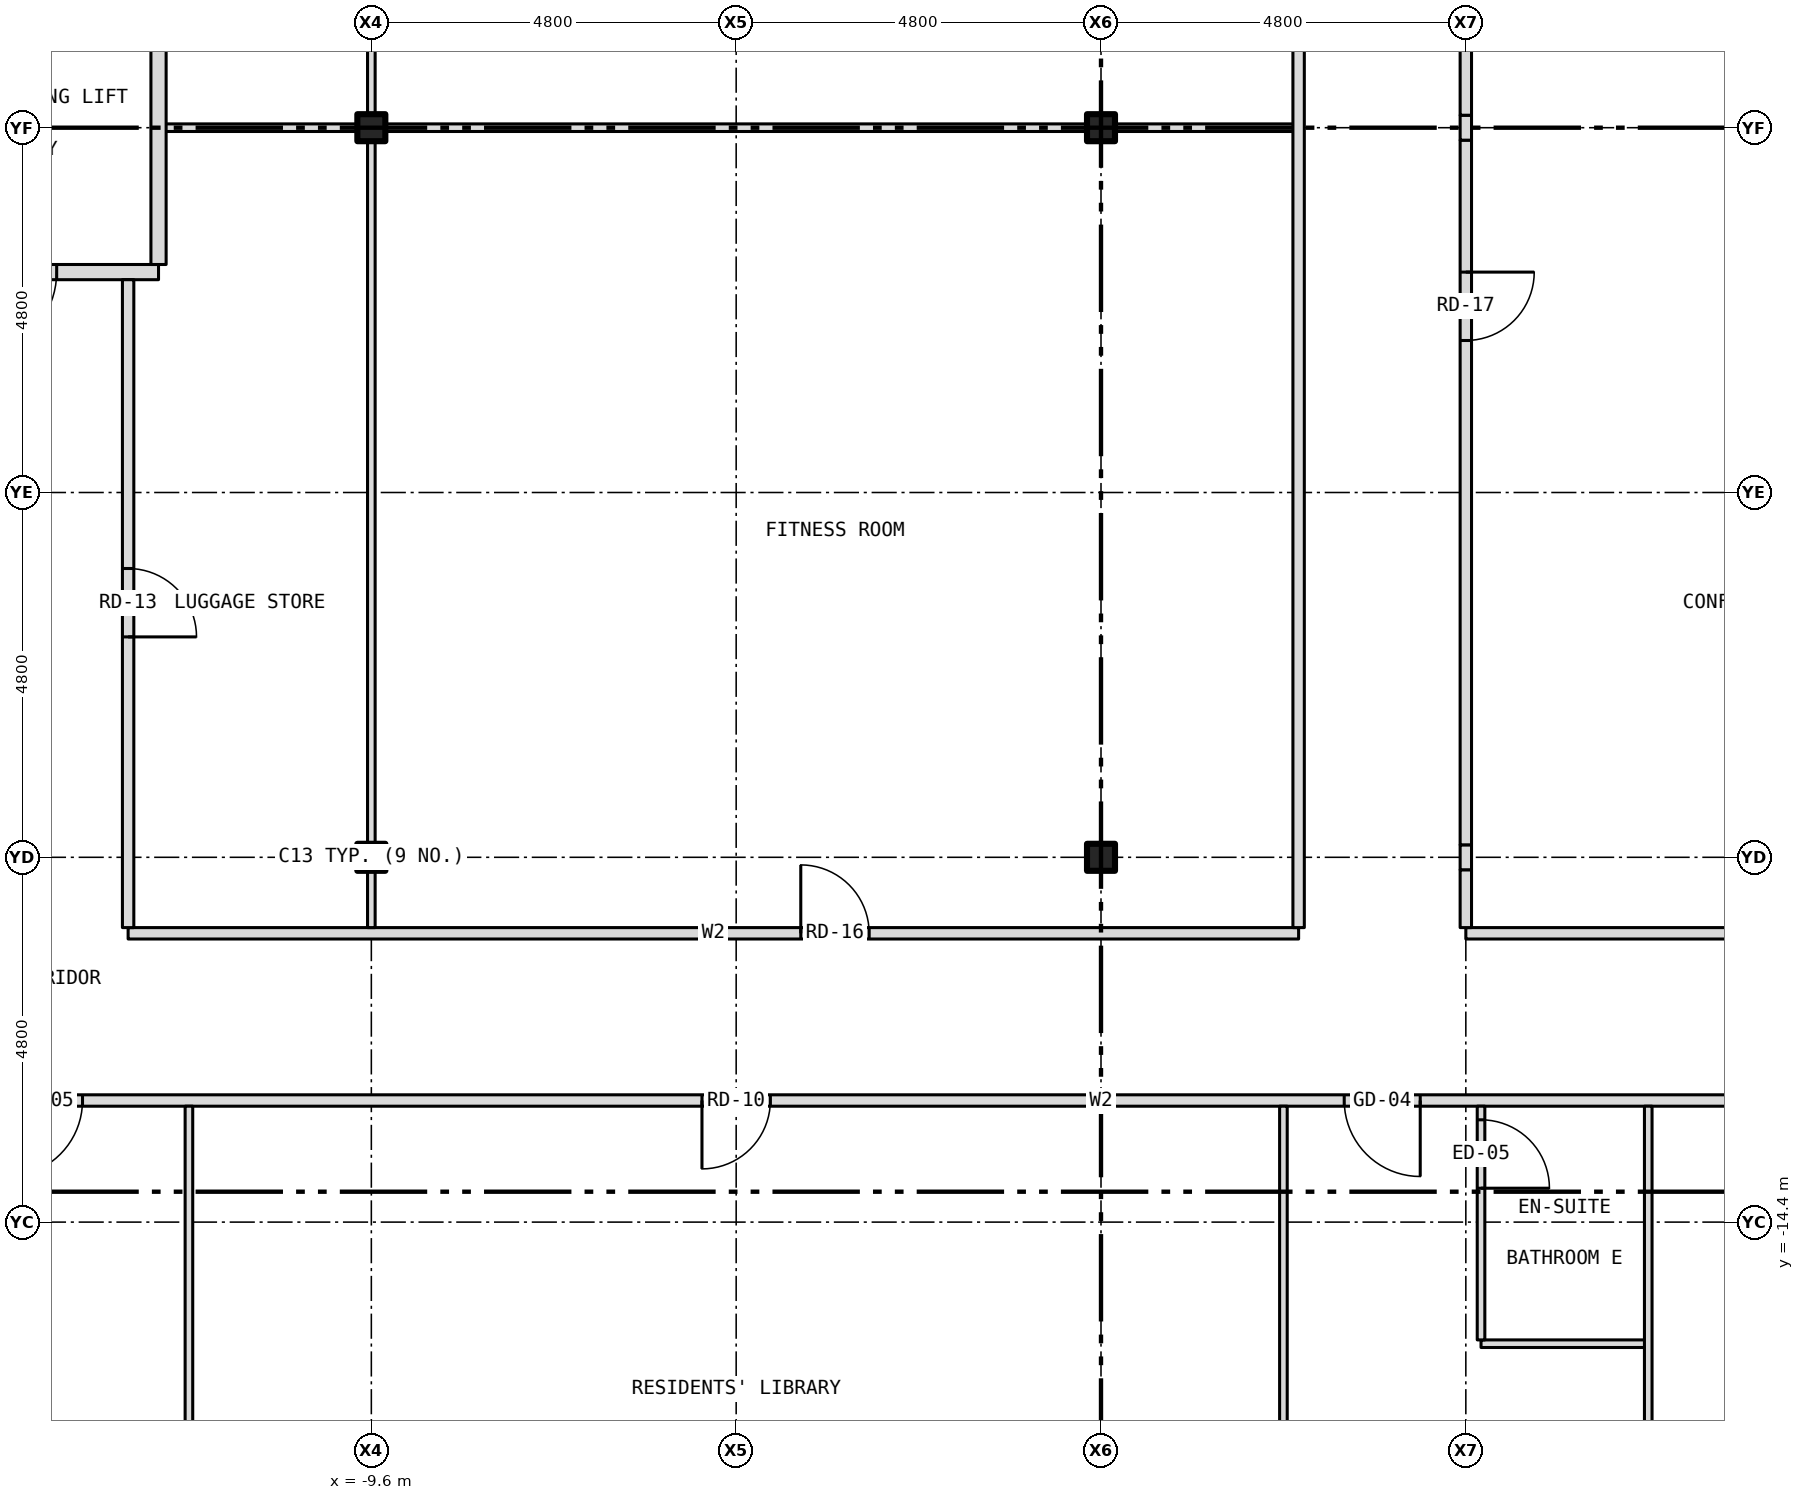
"""IFC4 building model, lengths in metres.
Left out: names, types, materials, properties, quantities, classifications, styles, units other than length and angle.
Written with IfcOpenShell. Run it as: python <this file> out.ifc"""

import sys

from ifc_helpers import new_model, si_unit, direction, frame, frame_2d, origin, origin_2d, place, context, subcontext, project, spatial, rectangle, i_section, extrude, element, fill, save


model = new_model("IFC4")
c1 = context("Model", 3, precision=1e-05, world=origin(), true_north=direction((0.0, 1.0)))
c2 = subcontext(c1, "Body", "Model", "MODEL_VIEW")
j1 = project(units=[si_unit("LENGTHUNIT", "METRE"), si_unit("PLANEANGLEUNIT", "RADIAN")], contexts=[c1])
p1 = place(None, origin())
s1 = spatial("IfcSite", under=j1, at=p1, CompositionType="ELEMENT")
p2 = place(p1, origin())
s2 = spatial("IfcBuilding", under=s1, at=p2, CompositionType="ELEMENT")
p3 = place(p2, frame((0.0, 0.0, 255.0)))
s3 = spatial("IfcBuildingStorey", under=s2, at=p3, CompositionType="ELEMENT", Elevation=255.0)
for number, where, z_axis, x_axis in (
    (1, (-9.6, -9.6, -0.15), (0.0, 0.0, 1.0), (1.0, 0.0, 0.0)),
    (2, (-9.6, 0.0, -0.15), (0.0, 0.0, 1.0), (1.0, 0.0, 0.0)),
    (3, (0.0, -9.6, -0.15), (0.0, 0.0, 1.0), (1.0, 0.0, 0.0)),
    (4, (0.0, 0.0, -0.15), (0.0, 0.0, 1.0), (1.0, 0.0, 0.0)),
):
    element("IfcColumn", number, at=place(p3, frame(where, z_axis=z_axis, x_axis=x_axis)), inside=s3, PredefinedType="COLUMN", context=c2, shape_type="SweptSolid", body=[
        extrude(i_section(OverallWidth=0.368, OverallDepth=0.356, WebThickness=0.011, FlangeThickness=0.018, at=origin_2d()), origin(), (0.0, 0.0, 1.0), 3.5),
    ])
p4 = place(p3, frame((5.0, -16.0, 0.0), z_axis=(0.0, 0.0, 1.0), x_axis=(1.0, 0.0, 0.0)))
e5 = element("IfcWall", 5, at=p4, inside=s3, PredefinedType="PARTITIONING", context=c2, shape_type="SweptSolid", body=[
    extrude(rectangle(XDim=2.2, YDim=0.1, at=frame_2d((1.1, 0.0))), origin(), (0.0, 0.0, 1.0), 3.35),
])
p5 = place(p3, frame((-15.8, -12.8, 0.0), z_axis=(0.0, 0.0, 1.0), x_axis=(1.0, 0.0, 0.0)))
e6 = element("IfcWall", 6, at=p5, inside=s3, PredefinedType="PARTITIONING", context=c2, shape_type="SweptSolid", body=[
    extrude(rectangle(XDim=31.6, YDim=0.15, at=frame_2d((15.8, 0.0))), origin(), (0.0, 0.0, 1.0), 3.35),
])
p6 = place(p5, frame((10.55, 0.0, 0.0)))
e7 = element("IfcOpeningElement", 7, at=p6, cuts=e6, PredefinedType="OPENING", context=c2, shape_type="SweptSolid", body=[
    extrude(rectangle(XDim=0.9, YDim=2.1, at=frame_2d((0.45, 1.05))), frame((0.0, 0.087, 0.0), z_axis=(0.0, -1.0, 0.0), x_axis=(1.0, 0.0, 0.0)), (0.0, 0.0, 1.0), 0.174),
])
p7 = place(p5, frame((19.0, 0.0, 0.0)))
e8 = element("IfcOpeningElement", 8, at=p7, cuts=e6, PredefinedType="OPENING", context=c2, shape_type="SweptSolid", body=[
    extrude(rectangle(XDim=1.0, YDim=2.1, at=frame_2d((0.5, 1.05))), frame((0.0, 0.087, 0.0), z_axis=(0.0, -1.0, 0.0), x_axis=(1.0, 0.0, 0.0)), (0.0, 0.0, 1.0), 0.174),
])
p8 = place(p5, frame((24.95, 0.0, 0.0)))
e9 = element("IfcOpeningElement", 9, at=p8, cuts=e6, PredefinedType="OPENING", context=c2, shape_type="SweptSolid", body=[
    extrude(rectangle(XDim=0.9, YDim=2.1, at=frame_2d((0.45, 1.05))), frame((0.0, 0.087, 0.0), z_axis=(0.0, -1.0, 0.0), x_axis=(1.0, 0.0, 0.0)), (0.0, 0.0, 1.0), 0.174),
])
p9 = place(p5, frame((1.4, 0.0, 0.0)))
e10 = element("IfcOpeningElement", 10, at=p9, cuts=e6, PredefinedType="OPENING", context=c2, shape_type="SweptSolid", body=[
    extrude(rectangle(XDim=1.0, YDim=2.1, at=frame_2d((0.5, 1.05))), frame((0.0, 0.087, 0.0), z_axis=(0.0, -1.0, 0.0), x_axis=(1.0, 0.0, 0.0)), (0.0, 0.0, 1.0), 0.174),
])
p10 = place(p5, frame((29.2, 0.0, 0.0)))
e11 = element("IfcOpeningElement", 11, at=p10, cuts=e6, PredefinedType="OPENING", context=c2, shape_type="SweptSolid", body=[
    extrude(rectangle(XDim=1.0, YDim=2.1, at=frame_2d((0.5, 1.05))), frame((0.0, 0.087, 0.0), z_axis=(0.0, -1.0, 0.0), x_axis=(1.0, 0.0, 0.0)), (0.0, 0.0, 1.0), 0.174),
])
p11 = place(p3, frame((-12.8, -10.6, 0.0), z_axis=(0.0, 0.0, 1.0), x_axis=(1.0, 0.0, 0.0)))
e12 = element("IfcWall", 12, at=p11, inside=s3, PredefinedType="PARTITIONING", context=c2, shape_type="SweptSolid", body=[
    extrude(rectangle(XDim=15.4, YDim=0.15, at=frame_2d((7.7, 0.0))), origin(), (0.0, 0.0, 1.0), 3.35),
])
p12 = place(p11, frame((8.85, 0.0, 0.0)))
e13 = element("IfcOpeningElement", 13, at=p12, cuts=e12, PredefinedType="OPENING", context=c2, shape_type="SweptSolid", body=[
    extrude(rectangle(XDim=0.9, YDim=2.1, at=frame_2d((0.45, 1.05))), frame((0.0, 0.087, 0.0), z_axis=(0.0, -1.0, 0.0), x_axis=(1.0, 0.0, 0.0)), (0.0, 0.0, 1.0), 0.174),
])
p13 = place(p3, frame((4.8, -10.6, 0.0), z_axis=(0.0, 0.0, 1.0), x_axis=(1.0, 0.0, 0.0)))
e14 = element("IfcWall", 14, at=p13, inside=s3, PredefinedType="PARTITIONING", context=c2, shape_type="SweptSolid", body=[
    extrude(rectangle(XDim=8.0, YDim=0.15, at=frame_2d((4.0, 0.0))), origin(), (0.0, 0.0, 1.0), 3.35),
])
p14 = place(p3, frame((-15.68, -1.9, 0.0), z_axis=(0.0, 0.0, 1.0), x_axis=(1.0, 0.0, 0.0)))
e15 = element("IfcWall", 15, at=p14, inside=s3, PredefinedType="PARTITIONING", context=c2, shape_type="SweptSolid", body=[
    extrude(rectangle(XDim=3.28, YDim=0.2, at=frame_2d((1.64, 0.0))), origin(), (0.0, 0.0, 1.0), 3.35),
])
p15 = place(p14, frame((0.84, 0.0, 0.0)))
e16 = element("IfcOpeningElement", 16, at=p15, cuts=e15, PredefinedType="OPENING", context=c2, shape_type="SweptSolid", body=[
    extrude(rectangle(XDim=1.1, YDim=2.1, at=frame_2d((0.55, 1.05))), frame((0.0, 0.112, 0.0), z_axis=(0.0, -1.0, 0.0), x_axis=(1.0, 0.0, 0.0)), (0.0, 0.0, 1.0), 0.224),
])
p16 = place(p3, frame((-12.4, 0.0, 0.0), z_axis=(0.0, 0.0, 1.0), x_axis=(1.0, 0.0, 0.0)))
e17 = element("IfcWall", 17, at=p16, inside=s3, PredefinedType="PARTITIONING", context=c2, shape_type="SweptSolid", body=[
    extrude(rectangle(XDim=2.616, YDim=0.1, at=frame_2d((1.308, 0.0))), origin(), (0.0, 0.0, 1.0), 2.728),
])
p17 = place(p3, frame((-9.784, 0.0, 0.0), z_axis=(0.0, 0.0, 1.0), x_axis=(1.0, 0.0, 0.0)))
e18 = element("IfcWall", 18, at=p17, inside=s3, PredefinedType="PARTITIONING", context=c2, shape_type="SweptSolid", body=[
    extrude(rectangle(XDim=0.368, YDim=0.1, at=frame_2d((0.184, 0.0))), origin(), (0.0, 0.0, 1.0), 3.35),
])
p18 = place(p3, frame((-9.416, 0.0, 0.0), z_axis=(0.0, 0.0, 1.0), x_axis=(1.0, 0.0, 0.0)))
e19 = element("IfcWall", 19, at=p18, inside=s3, PredefinedType="PARTITIONING", context=c2, shape_type="SweptSolid", body=[
    extrude(rectangle(XDim=9.232, YDim=0.1, at=frame_2d((4.616, 0.0))), origin(), (0.0, 0.0, 1.0), 2.728),
])
p19 = place(p3, frame((-0.184, 0.0, 0.0), z_axis=(0.0, 0.0, 1.0), x_axis=(1.0, 0.0, 0.0)))
e20 = element("IfcWall", 20, at=p19, inside=s3, PredefinedType="PARTITIONING", context=c2, shape_type="SweptSolid", body=[
    extrude(rectangle(XDim=0.368, YDim=0.1, at=frame_2d((0.184, 0.0))), origin(), (0.0, 0.0, 1.0), 3.35),
])
p20 = place(p3, frame((0.184, 0.0, 0.0), z_axis=(0.0, 0.0, 1.0), x_axis=(1.0, 0.0, 0.0)))
e21 = element("IfcWall", 21, at=p20, inside=s3, PredefinedType="PARTITIONING", context=c2, shape_type="SweptSolid", body=[
    extrude(rectangle(XDim=2.416, YDim=0.1, at=frame_2d((1.208, 0.0))), origin(), (0.0, 0.0, 1.0), 2.728),
])
p21 = place(p3, frame((-12.8, -10.525, 0.0), z_axis=(0.0, 0.0, 1.0), x_axis=(0.0, 1.0, 0.0)))
e22 = element("IfcWall", 22, at=p21, inside=s3, PredefinedType="PARTITIONING", context=c2, shape_type="SweptSolid", body=[
    extrude(rectangle(XDim=8.525, YDim=0.15, at=frame_2d((4.262, 0.0))), origin(), (0.0, 0.0, 1.0), 3.35),
])
p22 = place(p21, frame((3.825, 0.0, 0.0)))
e23 = element("IfcOpeningElement", 23, at=p22, cuts=e22, PredefinedType="OPENING", context=c2, shape_type="SweptSolid", body=[
    extrude(rectangle(XDim=0.9, YDim=2.1, at=frame_2d((0.45, 1.05))), frame((0.0, 0.087, 0.0), z_axis=(0.0, -1.0, 0.0), x_axis=(1.0, 0.0, 0.0)), (0.0, 0.0, 1.0), 0.174),
])
p23 = place(p3, frame((-12.4, -1.8, 0.0), z_axis=(0.0, 0.0, 1.0), x_axis=(0.0, 1.0, 0.0)))
e24 = element("IfcWall", 24, at=p23, inside=s3, PredefinedType="PARTITIONING", context=c2, shape_type="SweptSolid", body=[
    extrude(rectangle(XDim=4.0, YDim=0.2, at=frame_2d((2.0, 0.0))), origin(), (0.0, 0.0, 1.0), 3.35),
])
p24 = place(p3, frame((-12.0, -20.73, 0.0), z_axis=(0.0, 0.0, 1.0), x_axis=(0.0, 1.0, 0.0)))
e25 = element("IfcWall", 25, at=p24, inside=s3, PredefinedType="PARTITIONING", context=c2, shape_type="SweptSolid", body=[
    extrude(rectangle(XDim=7.855, YDim=0.1, at=frame_2d((3.927, 0.0))), origin(), (0.0, 0.0, 1.0), 3.35),
])
p25 = place(p3, frame((-9.6, -10.525, 0.0), z_axis=(0.0, 0.0, 1.0), x_axis=(0.0, 1.0, 0.0)))
e26 = element("IfcWall", 26, at=p25, inside=s3, PredefinedType="PARTITIONING", context=c2, shape_type="SweptSolid", body=[
    extrude(rectangle(XDim=0.741, YDim=0.1, at=frame_2d((0.371, 0.0))), origin(), (0.0, 0.0, 1.0), 2.728),
])
p26 = place(p3, frame((-9.6, -9.784, 0.0), z_axis=(0.0, 0.0, 1.0), x_axis=(0.0, 1.0, 0.0)))
e27 = element("IfcWall", 27, at=p26, inside=s3, PredefinedType="PARTITIONING", context=c2, shape_type="SweptSolid", body=[
    extrude(rectangle(XDim=0.368, YDim=0.1, at=frame_2d((0.184, 0.0))), origin(), (0.0, 0.0, 1.0), 3.35),
])
p27 = place(p3, frame((-9.6, -9.416, 0.0), z_axis=(0.0, 0.0, 1.0), x_axis=(0.0, 1.0, 0.0)))
e28 = element("IfcWall", 28, at=p27, inside=s3, PredefinedType="PARTITIONING", context=c2, shape_type="SweptSolid", body=[
    extrude(rectangle(XDim=9.366, YDim=0.1, at=frame_2d((4.683, 0.0))), origin(), (0.0, 0.0, 1.0), 2.728),
])
p28 = place(p3, frame((-9.6, 0.05, 0.0), z_axis=(0.0, 0.0, 1.0), x_axis=(0.0, 1.0, 0.0)))
e29 = element("IfcWall", 29, at=p28, inside=s3, PredefinedType="PARTITIONING", context=c2, shape_type="SweptSolid", body=[
    extrude(rectangle(XDim=5.775, YDim=0.1, at=frame_2d((2.887, 0.0))), origin(), (0.0, 0.0, 1.0), 2.728),
])
p29 = place(p3, frame((2.4, -20.73, 0.0), z_axis=(0.0, 0.0, 1.0), x_axis=(0.0, 1.0, 0.0)))
e30 = element("IfcWall", 30, at=p29, inside=s3, PredefinedType="PARTITIONING", context=c2, shape_type="SweptSolid", body=[
    extrude(rectangle(XDim=7.855, YDim=0.1, at=frame_2d((3.927, 0.0))), origin(), (0.0, 0.0, 1.0), 3.35),
])
p30 = place(p3, frame((2.6, -10.525, 0.0), z_axis=(0.0, 0.0, 1.0), x_axis=(0.0, 1.0, 0.0)))
e31 = element("IfcWall", 31, at=p30, inside=s3, PredefinedType="PARTITIONING", context=c2, shape_type="SweptSolid", body=[
    extrude(rectangle(XDim=16.35, YDim=0.15, at=frame_2d((8.175, 0.0))), origin(), (0.0, 0.0, 1.0), 3.35),
])
p31 = place(p3, frame((4.8, -10.525, 0.0), z_axis=(0.0, 0.0, 1.0), x_axis=(0.0, 1.0, 0.0)))
e32 = element("IfcWall", 32, at=p31, inside=s3, PredefinedType="PARTITIONING", context=c2, shape_type="SweptSolid", body=[
    extrude(rectangle(XDim=0.761, YDim=0.15, at=frame_2d((0.38, 0.0))), origin(), (0.0, 0.0, 1.0), 2.817),
])
p32 = place(p3, frame((4.8, -9.764, 0.0), z_axis=(0.0, 0.0, 1.0), x_axis=(0.0, 1.0, 0.0)))
e33 = element("IfcWall", 33, at=p32, inside=s3, PredefinedType="PARTITIONING", context=c2, shape_type="SweptSolid", body=[
    extrude(rectangle(XDim=0.328, YDim=0.15, at=frame_2d((0.164, 0.0))), origin(), (0.0, 0.0, 1.0), 3.35),
])
p33 = place(p3, frame((4.8, -9.436, 0.0), z_axis=(0.0, 0.0, 1.0), x_axis=(0.0, 1.0, 0.0)))
e34 = element("IfcWall", 34, at=p33, inside=s3, PredefinedType="PARTITIONING", context=c2, shape_type="SweptSolid", body=[
    extrude(rectangle(XDim=9.272, YDim=0.15, at=frame_2d((4.636, 0.0))), origin(), (0.0, 0.0, 1.0), 2.817),
])
p34 = place(p33, frame((6.636, 0.0, 0.0)))
e35 = element("IfcOpeningElement", 35, at=p34, cuts=e34, PredefinedType="OPENING", context=c2, shape_type="SweptSolid", body=[
    extrude(rectangle(XDim=0.9, YDim=2.1, at=frame_2d((0.45, 1.05))), frame((0.0, 0.087, 0.0), z_axis=(0.0, -1.0, 0.0), x_axis=(1.0, 0.0, 0.0)), (0.0, 0.0, 1.0), 0.174),
])
p35 = place(p3, frame((4.8, -0.164, 0.0), z_axis=(0.0, 0.0, 1.0), x_axis=(0.0, 1.0, 0.0)))
e36 = element("IfcWall", 36, at=p35, inside=s3, PredefinedType="PARTITIONING", context=c2, shape_type="SweptSolid", body=[
    extrude(rectangle(XDim=0.328, YDim=0.15, at=frame_2d((0.164, 0.0))), origin(), (0.0, 0.0, 1.0), 3.35),
])
p36 = place(p3, frame((4.8, 0.164, 0.0), z_axis=(0.0, 0.0, 1.0), x_axis=(0.0, 1.0, 0.0)))
e37 = element("IfcWall", 37, at=p36, inside=s3, PredefinedType="PARTITIONING", context=c2, shape_type="SweptSolid", body=[
    extrude(rectangle(XDim=5.661, YDim=0.15, at=frame_2d((2.831, 0.0))), origin(), (0.0, 0.0, 1.0), 2.817),
])
p37 = place(p3, frame((5.0, -15.95, 0.0), z_axis=(0.0, 0.0, 1.0), x_axis=(0.0, 1.0, 0.0)))
e38 = element("IfcWall", 38, at=p37, inside=s3, PredefinedType="PARTITIONING", context=c2, shape_type="SweptSolid", body=[
    extrude(rectangle(XDim=3.075, YDim=0.1, at=frame_2d((1.538, 0.0))), origin(), (0.0, 0.0, 1.0), 3.35),
])
p38 = place(p37, frame((1.996, 0.0, 0.0)))
e39 = element("IfcOpeningElement", 39, at=p38, cuts=e38, PredefinedType="OPENING", context=c2, shape_type="SweptSolid", body=[
    extrude(rectangle(XDim=0.9, YDim=2.1, at=frame_2d((0.45, 1.05))), frame((0.0, 0.062, 0.0), z_axis=(0.0, -1.0, 0.0), x_axis=(1.0, 0.0, 0.0)), (0.0, 0.0, 1.0), 0.124),
])
p39 = place(p3, frame((7.2, -20.73, 0.0), z_axis=(0.0, 0.0, 1.0), x_axis=(0.0, 1.0, 0.0)))
e40 = element("IfcWall", 40, at=p39, inside=s3, PredefinedType="PARTITIONING", context=c2, shape_type="SweptSolid", body=[
    extrude(rectangle(XDim=7.855, YDim=0.1, at=frame_2d((3.927, 0.0))), origin(), (0.0, 0.0, 1.0), 3.35),
])
p40 = place(p15, origin())
e41 = element("IfcDoor", 41, at=p40, inside=s3, OperationType="SINGLE_SWING_LEFT", PredefinedType="DOOR", context=c2, shape_type="SweptSolid", body=[
    extrude(rectangle(XDim=1.1, YDim=2.1, at=frame_2d((0.55, 1.05))), frame((0.0, 0.025, 0.0), z_axis=(0.0, -1.0, 0.0), x_axis=(1.0, 0.0, 0.0)), (0.0, 0.0, 1.0), 0.05),
])
fill(e16, e41)
p41 = place(p6, origin())
e42 = element("IfcDoor", 42, at=p41, inside=s3, OperationType="SINGLE_SWING_LEFT", PredefinedType="DOOR", context=c2, shape_type="SweptSolid", body=[
    extrude(rectangle(XDim=0.9, YDim=2.1, at=frame_2d((0.45, 1.05))), frame((0.0, 0.025, 0.0), z_axis=(0.0, -1.0, 0.0), x_axis=(1.0, 0.0, 0.0)), (0.0, 0.0, 1.0), 0.05),
])
fill(e7, e42)
p42 = place(p7, origin())
e43 = element("IfcDoor", 43, at=p42, inside=s3, OperationType="SINGLE_SWING_RIGHT", PredefinedType="DOOR", context=c2, shape_type="SweptSolid", body=[
    extrude(rectangle(XDim=1.0, YDim=2.1, at=frame_2d((0.5, 1.05))), frame((0.0, 0.025, 0.0), z_axis=(0.0, -1.0, 0.0), x_axis=(1.0, 0.0, 0.0)), (0.0, 0.0, 1.0), 0.05),
])
fill(e8, e43)
p43 = place(p38, origin())
e44 = element("IfcDoor", 44, at=p43, inside=s3, OperationType="SINGLE_SWING_LEFT", PredefinedType="DOOR", context=c2, shape_type="SweptSolid", body=[
    extrude(rectangle(XDim=0.9, YDim=2.1, at=frame_2d((0.45, 1.05))), frame((0.0, 0.025, 0.0), z_axis=(0.0, -1.0, 0.0), x_axis=(1.0, 0.0, 0.0)), (0.0, 0.0, 1.0), 0.05),
])
fill(e39, e44)
p44 = place(p9, origin())
e45 = element("IfcDoor", 45, at=p44, inside=s3, OperationType="SINGLE_SWING_LEFT", PredefinedType="DOOR", context=c2, shape_type="SweptSolid", body=[
    extrude(rectangle(XDim=1.0, YDim=2.1, at=frame_2d((0.5, 1.05))), frame((0.0, 0.025, 0.0), z_axis=(0.0, -1.0, 0.0), x_axis=(1.0, 0.0, 0.0)), (0.0, 0.0, 1.0), 0.05),
])
fill(e10, e45)
p45 = place(p22, origin())
e46 = element("IfcDoor", 46, at=p45, inside=s3, OperationType="SINGLE_SWING_LEFT", PredefinedType="DOOR", context=c2, shape_type="SweptSolid", body=[
    extrude(rectangle(XDim=0.9, YDim=2.1, at=frame_2d((0.45, 1.05))), frame((0.0, 0.025, 0.0), z_axis=(0.0, -1.0, 0.0), x_axis=(1.0, 0.0, 0.0)), (0.0, 0.0, 1.0), 0.05),
])
fill(e23, e46)
p46 = place(p12, origin())
e47 = element("IfcDoor", 47, at=p46, inside=s3, OperationType="SINGLE_SWING_LEFT", PredefinedType="DOOR", context=c2, shape_type="SweptSolid", body=[
    extrude(rectangle(XDim=0.9, YDim=2.1, at=frame_2d((0.45, 1.05))), frame((0.0, 0.025, 0.0), z_axis=(0.0, -1.0, 0.0), x_axis=(1.0, 0.0, 0.0)), (0.0, 0.0, 1.0), 0.05),
])
fill(e13, e47)
p47 = place(p34, origin())
e48 = element("IfcDoor", 48, at=p47, inside=s3, OperationType="SINGLE_SWING_RIGHT", PredefinedType="DOOR", context=c2, shape_type="SweptSolid", body=[
    extrude(rectangle(XDim=0.9, YDim=2.1, at=frame_2d((0.45, 1.05))), frame((0.0, 0.025, 0.0), z_axis=(0.0, -1.0, 0.0), x_axis=(1.0, 0.0, 0.0)), (0.0, 0.0, 1.0), 0.05),
])
fill(e35, e48)
save(model, sys.argv[1])
